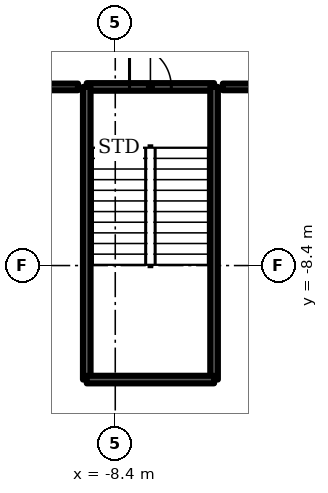
"""IFC4 building model, lengths in metres.
Left out: names, types, materials, properties, quantities, classifications, styles, units other than length and angle.
Written with IfcOpenShell. Run it as: python <this file> out.ifc"""

import sys

from ifc_helpers import new_model, si_unit, direction, frame, frame_2d, origin, place, context, subcontext, project, spatial, rectangle, extrude, element, fill, save


model = new_model("IFC4")
c1 = context("Model", 3, precision=1e-05, world=origin(), true_north=direction((0.0, 1.0)))
c2 = subcontext(c1, "Body", "Model", "MODEL_VIEW")
j1 = project(units=[si_unit("LENGTHUNIT", "METRE"), si_unit("PLANEANGLEUNIT", "RADIAN")], contexts=[c1])
p1 = place(None, origin())
s1 = spatial("IfcSite", under=j1, at=p1, CompositionType="ELEMENT")
p2 = place(p1, origin())
s2 = spatial("IfcBuilding", under=s1, at=p2, CompositionType="ELEMENT")
p3 = place(p2, frame((0.0, 0.0, 6.0)))
s3 = spatial("IfcBuildingStorey", under=s2, at=p3, CompositionType="ELEMENT", Elevation=6.0)
p4 = place(p3, frame((-9.15, -3.7, -0.35), z_axis=(0.0, 0.0, 1.0), x_axis=(1.0, 0.0, 0.0)))
e1 = element("IfcWall", 1, at=p4, inside=s3, PredefinedType="SOLIDWALL", context=c2, shape_type="SweptSolid", body=[
    extrude(rectangle(XDim=3.35, YDim=0.2, at=frame_2d((1.675, 0.0))), origin(), (0.0, 0.0, 1.0), 4.05),
])
p5 = place(p4, frame((1.125, 0.0, 0.0)))
e2 = element("IfcOpeningElement", 2, at=p5, cuts=e1, PredefinedType="OPENING", context=c2, shape_type="SweptSolid", body=[
    extrude(rectangle(XDim=1.1, YDim=2.1, at=frame_2d((0.55, 1.05))), frame((0.0, 0.1, 0.0), z_axis=(0.0, -1.0, 0.0), x_axis=(1.0, 0.0, 0.0)), (0.0, 0.0, 1.0), 0.2),
])
for number, where, z_axis, x_axis in (
    (3, (-9.15, -3.7, -0.35), (0.0, 0.0, 1.0), (0.0, -1.0, 0.0)),
    (4, (-5.8, -3.7, -0.35), (0.0, 0.0, 1.0), (0.0, -1.0, 0.0)),
):
    element("IfcWall", number, at=place(p3, frame(where, z_axis=z_axis, x_axis=x_axis)), inside=s3, PredefinedType="SOLIDWALL", context=c2, shape_type="SweptSolid", body=[
        extrude(rectangle(XDim=7.7, YDim=0.2, at=frame_2d((3.85, 0.0))), origin(), (0.0, 0.0, 1.0), 4.05),
    ])
p6 = place(p3, frame((-9.15, -11.4, -0.35), z_axis=(0.0, 0.0, 1.0), x_axis=(1.0, 0.0, 0.0)))
e5 = element("IfcWall", 5, at=p6, inside=s3, PredefinedType="SOLIDWALL", context=c2, shape_type="SweptSolid", body=[
    extrude(rectangle(XDim=3.35, YDim=0.2, at=frame_2d((1.675, 0.0))), origin(), (0.0, 0.0, 1.0), 4.05),
])
p7 = place(p3, frame((-14.0, -3.7, 0.0), z_axis=(0.0, 0.0, 1.0), x_axis=(1.0, 0.0, 0.0)))
e6 = element("IfcWall", 6, at=p7, inside=s3, PredefinedType="PARTITIONING", context=c2, shape_type="SweptSolid", body=[
    extrude(rectangle(XDim=4.62, YDim=0.175, at=frame_2d((2.31, 0.0))), origin(), (0.0, 0.0, 1.0), 3.65),
])
p8 = place(p3, frame((-5.57, -3.7, 0.0), z_axis=(0.0, 0.0, 1.0), x_axis=(1.0, 0.0, 0.0)))
e7 = element("IfcWall", 7, at=p8, inside=s3, PredefinedType="PARTITIONING", context=c2, shape_type="SweptSolid", body=[
    extrude(rectangle(XDim=11.14, YDim=0.175, at=frame_2d((5.57, 0.0))), origin(), (0.0, 0.0, 1.0), 3.65),
])
p9 = place(p8, frame((4.77, 0.0, 0.0)))
e8 = element("IfcOpeningElement", 8, at=p9, cuts=e7, PredefinedType="OPENING", context=c2, shape_type="SweptSolid", body=[
    extrude(rectangle(XDim=1.6, YDim=2.1, at=frame_2d((0.8, 1.05))), frame((0.0, 0.087, 0.0), z_axis=(0.0, -1.0, 0.0), x_axis=(1.0, 0.0, 0.0)), (0.0, 0.0, 1.0), 0.175),
])
p10 = place(p5, origin())
e9 = element("IfcDoor", 9, at=p10, inside=s3, OperationType="SINGLE_SWING_LEFT", PredefinedType="DOOR", context=c2, shape_type="SweptSolid", body=[
    extrude(rectangle(XDim=1.1, YDim=2.1, at=frame_2d((0.55, 1.05))), frame((0.0, 0.025, 0.0), z_axis=(0.0, -1.0, 0.0), x_axis=(1.0, 0.0, 0.0)), (0.0, 0.0, 1.0), 0.05),
])
fill(e2, e9)
save(model, sys.argv[1])
